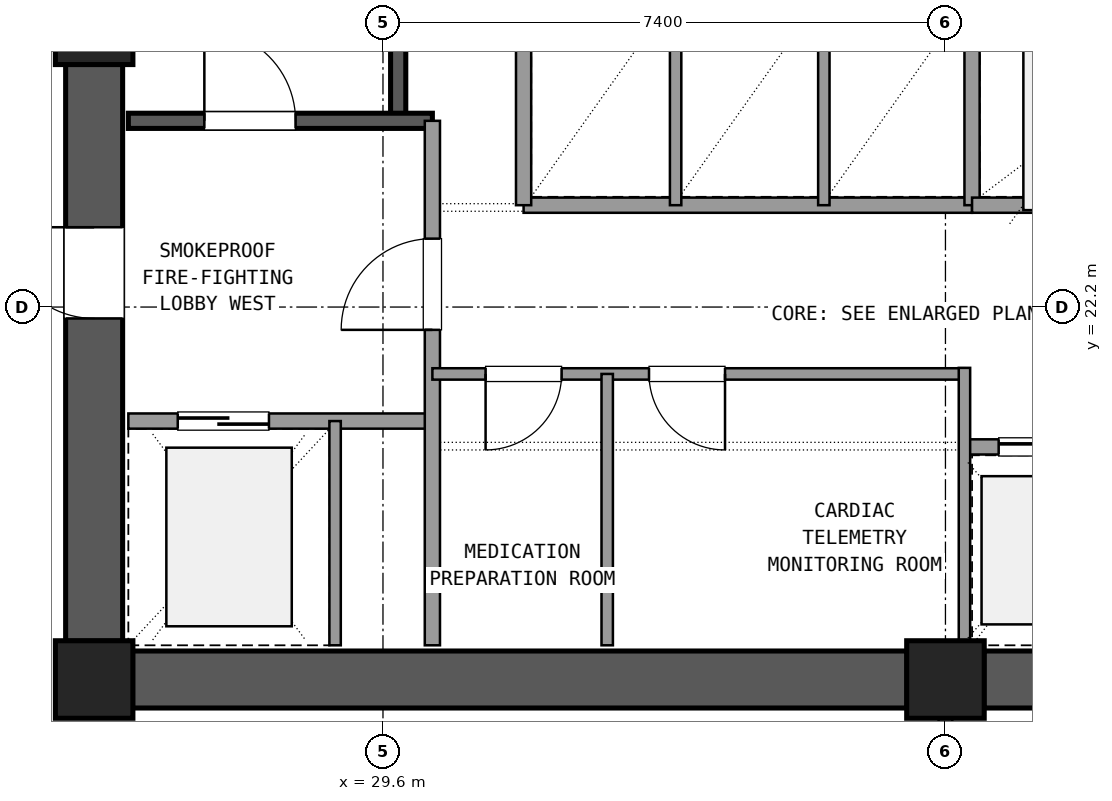
"""IFC4 building model, lengths in metres.
Left out: names, types, materials, properties, quantities, classifications, styles, units other than length and angle.
Written with IfcOpenShell. Run it as: python <this file> out.ifc"""

import sys

from ifc_helpers import new_model, si_unit, direction, frame, frame_2d, origin, origin_2d, place, context, subcontext, project, spatial, rectangle, extrude, element, fill, save


model = new_model("IFC4")
c1 = context("Model", 3, precision=1e-05, world=origin(), true_north=direction((0.0, 1.0)))
c2 = subcontext(c1, "Body", "Model", "MODEL_VIEW")
j1 = project(units=[si_unit("LENGTHUNIT", "METRE"), si_unit("PLANEANGLEUNIT", "RADIAN")], contexts=[c1])
p1 = place(None, origin())
s1 = spatial("IfcSite", under=j1, at=p1, CompositionType="ELEMENT")
p2 = place(p1, origin())
s2 = spatial("IfcBuilding", under=s1, at=p2, CompositionType="ELEMENT")
p3 = place(p2, frame((0.0, 0.0, 149.22)))
s3 = spatial("IfcBuildingStorey", under=s2, at=p3, CompositionType="ELEMENT", Elevation=149.22)
for number, where, z_axis, x_axis in (
    (1, (25.8, 17.3, 0.0), (0.0, 0.0, 1.0), (1.0, 0.0, 0.0)),
    (2, (37.0, 17.3, 0.0), (0.0, 0.0, 1.0), (1.0, 0.0, 0.0)),
    (3, (25.8, 25.9, 0.0), (0.0, 0.0, 1.0), (1.0, 0.0, 0.0)),
):
    element("IfcColumn", number, at=place(p3, frame(where, z_axis=z_axis, x_axis=x_axis)), inside=s3, PredefinedType="COLUMN", context=c2, shape_type="SweptSolid", body=[
        extrude(rectangle(XDim=1.02, YDim=1.02, at=origin_2d()), origin(), (0.0, 0.0, 1.0), 3.6),
    ])
for number, where, z_axis, x_axis in (
    (4, (26.305, 17.3, 0.0), (0.0, 0.0, 1.0), (1.0, 0.0, 0.0)),
    (5, (37.505, 17.3, 0.0), (0.0, 0.0, 1.0), (1.0, 0.0, 0.0)),
):
    element("IfcWall", number, at=place(p3, frame(where, z_axis=z_axis, x_axis=x_axis)), inside=s3, PredefinedType="SHEAR", context=c2, shape_type="SweptSolid", body=[
        extrude(rectangle(XDim=10.19, YDim=0.75, at=frame_2d((5.095, 0.0))), origin(), (0.0, 0.0, 1.0), 3.32),
    ])
p4 = place(p3, frame((25.8, 25.395, 0.0), z_axis=(0.0, 0.0, 1.0), x_axis=(0.0, -1.0, 0.0)))
e6 = element("IfcWall", 6, at=p4, inside=s3, PredefinedType="SHEAR", context=c2, shape_type="SweptSolid", body=[
    extrude(rectangle(XDim=7.59, YDim=0.75, at=frame_2d((3.795, 0.0))), origin(), (0.0, 0.0, 1.0), 3.32),
])
p5 = place(p4, frame((2.145, 0.0, 0.0)))
e7 = element("IfcOpeningElement", 7, at=p5, cuts=e6, PredefinedType="OPENING", context=c2, shape_type="SweptSolid", body=[
    extrude(rectangle(XDim=1.2, YDim=2.15, at=frame_2d((0.6, 1.075))), frame((0.0, 0.385, 0.0), z_axis=(0.0, -1.0, 0.0), x_axis=(1.0, 0.0, 0.0)), (0.0, 0.0, 1.0), 0.77),
])
p6 = place(p3, frame((29.8, 24.65, 0.0), z_axis=(0.0, 0.0, 1.0), x_axis=(0.0, 1.0, 0.0)))
e8 = element("IfcWall", 8, at=p6, inside=s3, PredefinedType="SHEAR", context=c2, shape_type="SweptSolid", body=[
    extrude(rectangle(XDim=9.4, YDim=0.2, at=frame_2d((4.7, 0.0))), origin(), (0.0, 0.0, 1.0), 3.32),
])
p7 = place(p3, frame((26.25, 24.65, 0.0), z_axis=(0.0, 0.0, 1.0), x_axis=(1.0, 0.0, 0.0)))
e9 = element("IfcWall", 9, at=p7, inside=s3, PredefinedType="SHEAR", context=c2, shape_type="SweptSolid", body=[
    extrude(rectangle(XDim=4.0, YDim=0.2, at=frame_2d((2.0, 0.0))), origin(), (0.0, 0.0, 1.0), 3.32),
])
p8 = place(p7, frame((1.0, 0.0, 0.0)))
e10 = element("IfcOpeningElement", 10, at=p8, cuts=e9, PredefinedType="OPENING", context=c2, shape_type="SweptSolid", body=[
    extrude(rectangle(XDim=1.2, YDim=2.15, at=frame_2d((0.6, 1.075))), frame((0.0, 0.11, 0.0), z_axis=(0.0, -1.0, 0.0), x_axis=(1.0, 0.0, 0.0)), (0.0, 0.0, 1.0), 0.22),
])
p9 = place(p3, frame((26.25, 20.7, 0.0), z_axis=(0.0, 0.0, 1.0), x_axis=(1.0, 0.0, 0.0)))
e11 = element("IfcWall", 11, at=p9, inside=s3, PredefinedType="SOLIDWALL", context=c2, shape_type="SweptSolid", body=[
    extrude(rectangle(XDim=4.0, YDim=0.2, at=frame_2d((2.0, 0.0))), origin(), (0.0, 0.0, 1.0), 2.61),
])
p10 = place(p9, frame((0.65, 0.0, 0.0)))
e12 = element("IfcOpeningElement", 12, at=p10, cuts=e11, PredefinedType="OPENING", context=c2, shape_type="SweptSolid", body=[
    extrude(rectangle(XDim=1.2, YDim=2.15, at=frame_2d((0.6, 1.075))), frame((0.0, 0.11, 0.0), z_axis=(0.0, -1.0, 0.0), x_axis=(1.0, 0.0, 0.0)), (0.0, 0.0, 1.0), 0.22),
])
p11 = place(p3, frame((30.25, 17.75, 0.0), z_axis=(0.0, 0.0, 1.0), x_axis=(0.0, 1.0, 0.0)))
e13 = element("IfcWall", 13, at=p11, inside=s3, PredefinedType="SOLIDWALL", context=c2, shape_type="SweptSolid", body=[
    extrude(rectangle(XDim=6.9, YDim=0.2, at=frame_2d((3.45, 0.0))), origin(), (0.0, 0.0, 1.0), 2.61),
])
p12 = place(p11, frame((4.15, 0.0, 0.0)))
e14 = element("IfcOpeningElement", 14, at=p12, cuts=e13, PredefinedType="OPENING", context=c2, shape_type="SweptSolid", body=[
    extrude(rectangle(XDim=1.2, YDim=2.15, at=frame_2d((0.6, 1.075))), frame((0.0, 0.11, 0.0), z_axis=(0.0, -1.0, 0.0), x_axis=(1.0, 0.0, 0.0)), (0.0, 0.0, 1.0), 0.22),
])
p13 = place(p3, frame((28.97, 17.75, 0.0), z_axis=(0.0, 0.0, 1.0), x_axis=(0.0, 1.0, 0.0)))
e15 = element("IfcWall", 15, at=p13, inside=s3, PredefinedType="PARTITIONING", context=c2, shape_type="SweptSolid", body=[
    extrude(rectangle(XDim=2.95, YDim=0.15, at=frame_2d((1.475, 0.0))), origin(), (0.0, 0.0, 1.0), 2.61),
])
p14 = place(p3, frame((30.25, 21.32, 0.0), z_axis=(0.0, 0.0, 1.0), x_axis=(1.0, 0.0, 0.0)))
e16 = element("IfcWall", 16, at=p14, inside=s3, PredefinedType="PARTITIONING", context=c2, shape_type="SweptSolid", body=[
    extrude(rectangle(XDim=7.0, YDim=0.15, at=frame_2d((3.5, 0.0))), origin(), (0.0, 0.0, 1.0), 2.61),
])
p15 = place(p14, frame((0.7, 0.0, 0.0)))
e17 = element("IfcOpeningElement", 17, at=p15, cuts=e16, PredefinedType="OPENING", context=c2, shape_type="SweptSolid", body=[
    extrude(rectangle(XDim=1.0, YDim=2.15, at=frame_2d((0.5, 1.075))), frame((0.0, 0.085, 0.0), z_axis=(0.0, -1.0, 0.0), x_axis=(1.0, 0.0, 0.0)), (0.0, 0.0, 1.0), 0.17),
])
p16 = place(p14, frame((2.85, 0.0, 0.0)))
e18 = element("IfcOpeningElement", 18, at=p16, cuts=e16, PredefinedType="OPENING", context=c2, shape_type="SweptSolid", body=[
    extrude(rectangle(XDim=1.0, YDim=2.15, at=frame_2d((0.5, 1.075))), frame((0.0, 0.085, 0.0), z_axis=(0.0, -1.0, 0.0), x_axis=(1.0, 0.0, 0.0)), (0.0, 0.0, 1.0), 0.17),
])
p17 = place(p3, frame((32.55, 17.75, 0.0), z_axis=(0.0, 0.0, 1.0), x_axis=(0.0, 1.0, 0.0)))
e19 = element("IfcWall", 19, at=p17, inside=s3, PredefinedType="PARTITIONING", context=c2, shape_type="SweptSolid", body=[
    extrude(rectangle(XDim=3.57, YDim=0.15, at=frame_2d((1.785, 0.0))), origin(), (0.0, 0.0, 1.0), 2.61),
])
p18 = place(p3, frame((37.25, 20.36, 0.0), z_axis=(0.0, 0.0, 1.0), x_axis=(1.0, 0.0, 0.0)))
e20 = element("IfcWall", 20, at=p18, inside=s3, PredefinedType="SOLIDWALL", context=c2, shape_type="SweptSolid", body=[
    extrude(rectangle(XDim=6.1, YDim=0.2, at=frame_2d((3.05, 0.0))), origin(), (0.0, 0.0, 1.0), 2.61),
])
p19 = place(p18, frame((0.45, 0.0, 0.0)))
e21 = element("IfcOpeningElement", 21, at=p19, cuts=e20, PredefinedType="OPENING", context=c2, shape_type="SweptSolid", body=[
    extrude(rectangle(XDim=1.1, YDim=2.15, at=frame_2d((0.55, 1.075))), frame((0.0, 0.11, 0.0), z_axis=(0.0, -1.0, 0.0), x_axis=(1.0, 0.0, 0.0)), (0.0, 0.0, 1.0), 0.22),
])
p20 = place(p18, frame((2.5, 0.0, 0.0)))
e22 = element("IfcOpeningElement", 22, at=p20, cuts=e20, PredefinedType="OPENING", context=c2, shape_type="SweptSolid", body=[
    extrude(rectangle(XDim=1.1, YDim=2.15, at=frame_2d((0.55, 1.075))), frame((0.0, 0.11, 0.0), z_axis=(0.0, -1.0, 0.0), x_axis=(1.0, 0.0, 0.0)), (0.0, 0.0, 1.0), 0.22),
])
p21 = place(p18, frame((4.55, 0.0, 0.0)))
e23 = element("IfcOpeningElement", 23, at=p21, cuts=e20, PredefinedType="OPENING", context=c2, shape_type="SweptSolid", body=[
    extrude(rectangle(XDim=1.1, YDim=2.15, at=frame_2d((0.55, 1.075))), frame((0.0, 0.11, 0.0), z_axis=(0.0, -1.0, 0.0), x_axis=(1.0, 0.0, 0.0)), (0.0, 0.0, 1.0), 0.22),
])
p22 = place(p3, frame((37.25, 17.75, 0.0), z_axis=(0.0, 0.0, 1.0), x_axis=(0.0, 1.0, 0.0)))
e24 = element("IfcWall", 24, at=p22, inside=s3, PredefinedType="PARTITIONING", context=c2, shape_type="SweptSolid", body=[
    extrude(rectangle(XDim=3.65, YDim=0.15, at=frame_2d((1.825, 0.0))), origin(), (0.0, 0.0, 1.0), 2.61),
])
p23 = place(p3, frame((31.45, 23.54, 0.0), z_axis=(0.0, 0.0, 1.0), x_axis=(1.0, 0.0, 0.0)))
e25 = element("IfcWall", 25, at=p23, inside=s3, PredefinedType="SOLIDWALL", context=c2, shape_type="SweptSolid", body=[
    extrude(rectangle(XDim=5.9, YDim=0.2, at=frame_2d((2.95, 0.0))), origin(), (0.0, 0.0, 1.0), 2.61),
])
p24 = place(p3, frame((31.45, 23.54, 0.0), z_axis=(0.0, 0.0, 1.0), x_axis=(0.0, 1.0, 0.0)))
e26 = element("IfcWall", 26, at=p24, inside=s3, PredefinedType="SOLIDWALL", context=c2, shape_type="SweptSolid", body=[
    extrude(rectangle(XDim=2.81, YDim=0.2, at=frame_2d((1.405, 0.0))), origin(), (0.0, 0.0, 1.0), 2.61),
])
for number, where, z_axis, x_axis in (
    (27, (33.45, 23.54, 0.0), (0.0, 0.0, 1.0), (0.0, 1.0, 0.0)),
    (28, (35.4, 23.54, 0.0), (0.0, 0.0, 1.0), (0.0, 1.0, 0.0)),
):
    element("IfcWall", number, at=place(p3, frame(where, z_axis=z_axis, x_axis=x_axis)), inside=s3, PredefinedType="PARTITIONING", context=c2, shape_type="SweptSolid", body=[
        extrude(rectangle(XDim=2.81, YDim=0.15, at=frame_2d((1.405, 0.0))), origin(), (0.0, 0.0, 1.0), 2.61),
    ])
p25 = place(p3, frame((37.35, 23.54, 0.0), z_axis=(0.0, 0.0, 1.0), x_axis=(0.0, 1.0, 0.0)))
e29 = element("IfcWall", 29, at=p25, inside=s3, PredefinedType="SOLIDWALL", context=c2, shape_type="SweptSolid", body=[
    extrude(rectangle(XDim=6.82, YDim=0.2, at=frame_2d((3.41, 0.0))), origin(), (0.0, 0.0, 1.0), 2.61),
])
p26 = place(p3, frame((37.35, 23.54, 0.0), z_axis=(0.0, 0.0, 1.0), x_axis=(1.0, 0.0, 0.0)))
e30 = element("IfcWall", 30, at=p26, inside=s3, PredefinedType="SOLIDWALL", context=c2, shape_type="SweptSolid", body=[
    extrude(rectangle(XDim=3.05, YDim=0.2, at=frame_2d((1.525, 0.0))), origin(), (0.0, 0.0, 1.0), 2.61),
])
p27 = place(p3, frame((37.0, 13.64, 0.0), z_axis=(0.0, 0.0, 1.0), x_axis=(0.0, 1.0, 0.0)))
e31 = element("IfcWall", 31, at=p27, inside=s3, PredefinedType="PARTITIONING", context=c2, shape_type="SweptSolid", body=[
    extrude(rectangle(XDim=3.21, YDim=0.18, at=frame_2d((1.605, 0.0))), origin(), (0.0, 0.0, 1.0), 2.61),
])
p28 = place(p27, frame((0.605, 0.0, 0.0)))
e32 = element("IfcOpeningElement", 32, at=p28, cuts=e31, PredefinedType="OPENING", context=c2, shape_type="SweptSolid", body=[
    extrude(rectangle(XDim=2.0, YDim=2.2, at=frame_2d((1.0, 1.1))), frame((0.0, 0.1, 0.0), z_axis=(0.0, -1.0, 0.0), x_axis=(1.0, 0.0, 0.0)), (0.0, 0.0, 1.0), 0.2),
])
p29 = place(p8, origin())
e33 = element("IfcDoor", 33, at=p29, inside=s3, OperationType="SINGLE_SWING_LEFT", PredefinedType="DOOR", context=c2, shape_type="SweptSolid", body=[
    extrude(rectangle(XDim=1.2, YDim=2.15, at=frame_2d((0.6, 1.075))), frame((0.0, 0.025, 0.0), z_axis=(0.0, -1.0, 0.0), x_axis=(1.0, 0.0, 0.0)), (0.0, 0.0, 1.0), 0.05),
])
fill(e10, e33)
p30 = place(p10, origin())
e34 = element("IfcDoor", 34, at=p30, inside=s3, OperationType="SLIDING_TO_LEFT", PredefinedType="DOOR", context=c2, shape_type="SweptSolid", body=[
    extrude(rectangle(XDim=1.2, YDim=2.15, at=frame_2d((0.6, 1.075))), frame((0.0, 0.025, 0.0), z_axis=(0.0, -1.0, 0.0), x_axis=(1.0, 0.0, 0.0)), (0.0, 0.0, 1.0), 0.05),
])
fill(e12, e34)
p31 = place(p12, origin())
e35 = element("IfcDoor", 35, at=p31, inside=s3, OperationType="SINGLE_SWING_LEFT", PredefinedType="DOOR", context=c2, shape_type="SweptSolid", body=[
    extrude(rectangle(XDim=1.2, YDim=2.15, at=frame_2d((0.6, 1.075))), frame((0.0, 0.025, 0.0), z_axis=(0.0, -1.0, 0.0), x_axis=(1.0, 0.0, 0.0)), (0.0, 0.0, 1.0), 0.05),
])
fill(e14, e35)
p32 = place(p5, frame((1.2, 0.0, 0.0), z_axis=(0.0, 0.0, 1.0), x_axis=(-1.0, 0.0, 0.0)))
e36 = element("IfcDoor", 36, at=p32, inside=s3, OperationType="SINGLE_SWING_LEFT", PredefinedType="DOOR", context=c2, shape_type="SweptSolid", body=[
    extrude(rectangle(XDim=1.2, YDim=2.15, at=frame_2d((0.6, 1.075))), frame((0.0, 0.025, 0.0), z_axis=(0.0, -1.0, 0.0), x_axis=(1.0, 0.0, 0.0)), (0.0, 0.0, 1.0), 0.05),
])
fill(e7, e36)
p33 = place(p15, frame((1.0, 0.0, 0.0), z_axis=(0.0, 0.0, 1.0), x_axis=(-1.0, 0.0, 0.0)))
e37 = element("IfcDoor", 37, at=p33, inside=s3, OperationType="SINGLE_SWING_LEFT", PredefinedType="DOOR", context=c2, shape_type="SweptSolid", body=[
    extrude(rectangle(XDim=1.0, YDim=2.15, at=frame_2d((0.5, 1.075))), frame((0.0, 0.025, 0.0), z_axis=(0.0, -1.0, 0.0), x_axis=(1.0, 0.0, 0.0)), (0.0, 0.0, 1.0), 0.05),
])
fill(e17, e37)
p34 = place(p16, frame((1.0, 0.0, 0.0), z_axis=(0.0, 0.0, 1.0), x_axis=(-1.0, 0.0, 0.0)))
e38 = element("IfcDoor", 38, at=p34, inside=s3, OperationType="SINGLE_SWING_RIGHT", PredefinedType="DOOR", context=c2, shape_type="SweptSolid", body=[
    extrude(rectangle(XDim=1.0, YDim=2.15, at=frame_2d((0.5, 1.075))), frame((0.0, 0.025, 0.0), z_axis=(0.0, -1.0, 0.0), x_axis=(1.0, 0.0, 0.0)), (0.0, 0.0, 1.0), 0.05),
])
fill(e18, e38)
p35 = place(p19, origin())
e39 = element("IfcDoor", 39, at=p35, inside=s3, OperationType="SLIDING_TO_LEFT", PredefinedType="DOOR", context=c2, shape_type="SweptSolid", body=[
    extrude(rectangle(XDim=1.1, YDim=2.15, at=frame_2d((0.55, 1.075))), frame((0.0, 0.025, 0.0), z_axis=(0.0, -1.0, 0.0), x_axis=(1.0, 0.0, 0.0)), (0.0, 0.0, 1.0), 0.05),
])
fill(e21, e39)
save(model, sys.argv[1])
